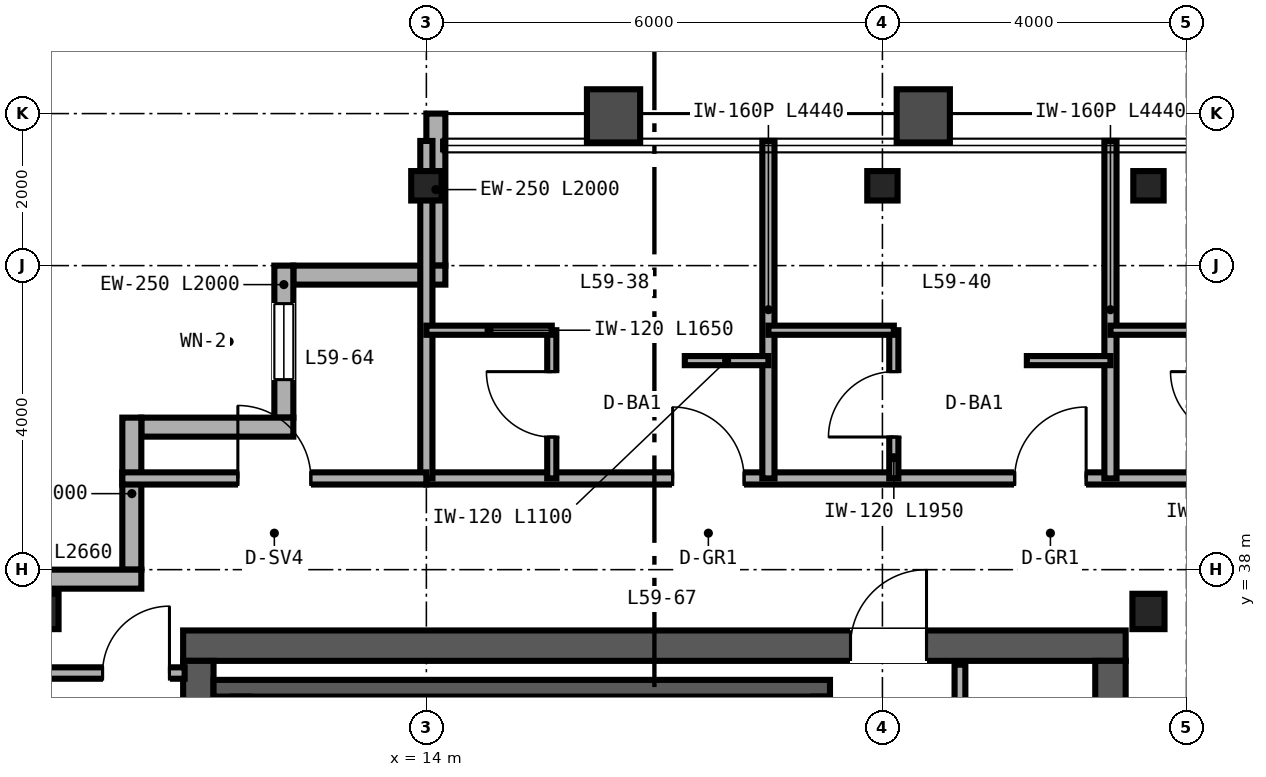
"""IFC4 building model, lengths in metres.
Left out: names, types, materials, properties, quantities, classifications, styles, units other than length and angle.
Written with IfcOpenShell. Run it as: python <this file> out.ifc"""

import sys

from ifc_helpers import new_model, si_unit, direction, frame, frame_2d, origin, origin_2d, place, context, subcontext, project, spatial, rectangle, i_section, extrude, source, transform, mapped, element, fill, save


model = new_model("IFC4")
c1 = context("Model", 3, precision=1e-05, world=origin(), true_north=direction((0.0, 1.0)))
c2 = subcontext(c1, "Body", "Model", "MODEL_VIEW")
j1 = project(units=[si_unit("LENGTHUNIT", "METRE"), si_unit("PLANEANGLEUNIT", "RADIAN")], contexts=[c1])
p1 = place(None, origin())
s1 = spatial("IfcSite", under=j1, at=p1, CompositionType="ELEMENT")
p2 = place(p1, origin())
s2 = spatial("IfcBuilding", under=s1, at=p2, CompositionType="ELEMENT")
p3 = place(p2, frame((0.0, 0.0, 236.4)))
s3 = spatial("IfcBuildingStorey", under=s2, at=p3, CompositionType="ELEMENT", Elevation=236.4)
p4 = place(p3, frame((10.8, 37.0, 0.0), z_axis=(0.0, 0.0, 1.0), x_axis=(1.0, 0.0, 0.0)))
e1 = element("IfcWall", 1, at=p4, inside=s3, PredefinedType="SHEAR", context=c2, shape_type="SweptSolid", body=[
    extrude(rectangle(XDim=12.4, YDim=0.4, at=frame_2d((6.2, 0.0))), origin(), (0.0, 0.0, 1.0), 3.38),
])
p5 = place(p4, frame((8.78, 0.0, 0.0)))
e2 = element("IfcOpeningElement", 2, at=p5, cuts=e1, PredefinedType="OPENING", context=c2, shape_type="SweptSolid", body=[
    extrude(rectangle(XDim=1.0, YDim=2.15, at=frame_2d((0.5, 1.075))), frame((0.0, 0.21, 0.0), z_axis=(0.0, -1.0, 0.0), x_axis=(1.0, 0.0, 0.0)), (0.0, 0.0, 1.0), 0.42),
])
for number, where, z_axis, x_axis in (
    (3, (11.0, 15.2, 0.0), (0.0, 0.0, 1.0), (0.0, 1.0, 0.0)),
    (4, (23.0, 15.2, 0.0), (0.0, 0.0, 1.0), (0.0, 1.0, 0.0)),
):
    element("IfcWall", number, at=place(p3, frame(where, z_axis=z_axis, x_axis=x_axis)), inside=s3, PredefinedType="SHEAR", context=c2, shape_type="SweptSolid", body=[
        extrude(rectangle(XDim=21.6, YDim=0.4, at=frame_2d((10.8, 0.0))), origin(), (0.0, 0.0, 1.0), 3.38),
    ])
p6 = place(p3, frame((11.2, 36.44, 0.0), z_axis=(0.0, 0.0, 1.0), x_axis=(1.0, 0.0, 0.0)))
e5 = element("IfcWall", 5, at=p6, inside=s3, PredefinedType="SHEAR", context=c2, shape_type="SweptSolid", body=[
    extrude(rectangle(XDim=8.11, YDim=0.22, at=frame_2d((4.055, 0.0))), origin(), (0.0, 0.0, 1.0), 3.4),
])
for number, where, z_axis, x_axis in (
    (6, (11.56, 33.05, 0.0), (0.0, 0.0, 1.0), (0.0, 1.0, 0.0)),
    (7, (19.2, 33.05, 0.0), (0.0, 0.0, 1.0), (0.0, 1.0, 0.0)),
):
    element("IfcWall", number, at=place(p3, frame(where, z_axis=z_axis, x_axis=x_axis)), inside=s3, PredefinedType="SHEAR", context=c2, shape_type="SweptSolid", body=[
        extrude(rectangle(XDim=3.28, YDim=0.22, at=frame_2d((1.64, 0.0))), origin(), (0.0, 0.0, 1.0), 3.4),
    ])
m1 = source(origin(), c2, "Body", "SweptSolid", [
    extrude(i_section(OverallWidth=0.422, OverallDepth=0.465, WebThickness=0.045, FlangeThickness=0.073, FilletRadius=0.025, at=origin_2d()), origin(), (0.0, 0.0, 1.0), 3.38),
])
for number, where, z_axis, x_axis in (
    (8, (8.95, 37.45, 0.0), (0.0, 0.0, 1.0), (1.0, 0.0, 0.0)),
    (9, (23.5, 37.45, 0.0), (0.0, 0.0, 1.0), (1.0, 0.0, 0.0)),
):
    element("IfcColumn", number, at=place(p3, frame(where, z_axis=z_axis, x_axis=x_axis)), inside=s3, PredefinedType="COLUMN", context=c2, shape_type="MappedRepresentation", body=[
        mapped(m1, transform((0.0, 0.0, 0.0), scale=1.0)),
    ])
m2 = source(origin(), c2, "Body", "SweptSolid", [
    extrude(i_section(OverallWidth=0.399, OverallDepth=0.387, WebThickness=0.021, FlangeThickness=0.033, FilletRadius=0.025, at=origin_2d()), origin(), (0.0, 0.0, 1.0), 3.38),
])
for number, where, z_axis, x_axis in (
    (10, (14.0, 43.05, 0.0), (0.0, 0.0, 1.0), (1.0, 0.0, 0.0)),
    (11, (20.0, 43.05, 0.0), (0.0, 0.0, 1.0), (1.0, 0.0, 0.0)),
    (12, (23.5, 43.05, 0.0), (0.0, 0.0, 1.0), (1.0, 0.0, 0.0)),
):
    element("IfcColumn", number, at=place(p3, frame(where, z_axis=z_axis, x_axis=x_axis)), inside=s3, PredefinedType="COLUMN", context=c2, shape_type="MappedRepresentation", body=[
        mapped(m2, transform((0.0, 0.0, 0.0), scale=1.0)),
    ])
p7 = place(p3, frame((14.125, 44.0, 0.0), z_axis=(0.0, 0.0, 1.0), x_axis=(0.0, -1.0, 0.0)))
e13 = element("IfcWall", 13, at=p7, inside=s3, PredefinedType="SOLIDWALL", context=c2, shape_type="SweptSolid", body=[
    extrude(rectangle(XDim=2.0, YDim=0.25, at=frame_2d((1.0, 0.0))), origin(), (0.0, 0.0, 1.0), 2.687),
])
p8 = place(p3, frame((14.25, 41.875, 0.0), z_axis=(0.0, 0.0, 1.0), x_axis=(-1.0, 0.0, 0.0)))
e14 = element("IfcWall", 14, at=p8, inside=s3, PredefinedType="SOLIDWALL", context=c2, shape_type="SweptSolid", body=[
    extrude(rectangle(XDim=2.0, YDim=0.25, at=frame_2d((1.0, 0.0))), origin(), (0.0, 0.0, 1.0), 3.38),
])
p9 = place(p3, frame((12.125, 42.0, 0.0), z_axis=(0.0, 0.0, 1.0), x_axis=(0.0, -1.0, 0.0)))
e15 = element("IfcWall", 15, at=p9, inside=s3, PredefinedType="SOLIDWALL", context=c2, shape_type="SweptSolid", body=[
    extrude(rectangle(XDim=2.0, YDim=0.25, at=frame_2d((1.0, 0.0))), origin(), (0.0, 0.0, 1.0), 3.38),
])
p10 = place(p9, frame((0.5, 0.0, 0.85)))
e16 = element("IfcOpeningElement", 16, at=p10, cuts=e15, PredefinedType="OPENING", context=c2, shape_type="SweptSolid", body=[
    extrude(rectangle(XDim=1.0, YDim=1.9, at=frame_2d((0.5, 0.95))), frame((0.0, 0.135, 0.0), z_axis=(0.0, -1.0, 0.0), x_axis=(1.0, 0.0, 0.0)), (0.0, 0.0, 1.0), 0.27),
])
for number, where, z_axis, x_axis in (
    (17, (12.25, 39.875, 0.0), (0.0, 0.0, 1.0), (-1.0, 0.0, 0.0)),
    (18, (10.125, 40.0, 0.0), (0.0, 0.0, 1.0), (0.0, -1.0, 0.0)),
):
    element("IfcWall", number, at=place(p3, frame(where, z_axis=z_axis, x_axis=x_axis)), inside=s3, PredefinedType="SOLIDWALL", context=c2, shape_type="SweptSolid", body=[
        extrude(rectangle(XDim=2.0, YDim=0.25, at=frame_2d((1.0, 0.0))), origin(), (0.0, 0.0, 1.0), 3.38),
    ])
p11 = place(p3, frame((10.25, 37.875, 0.0), z_axis=(0.0, 0.0, 1.0), x_axis=(-1.0, 0.0, 0.0)))
e19 = element("IfcWall", 19, at=p11, inside=s3, PredefinedType="SOLIDWALL", context=c2, shape_type="SweptSolid", body=[
    extrude(rectangle(XDim=2.25, YDim=0.25, at=frame_2d((1.125, 0.0))), origin(), (0.0, 0.0, 1.0), 3.38),
])
p12 = place(p3, frame((21.02, 33.28, 0.0), z_axis=(0.0, 0.0, 1.0), x_axis=(0.0, 1.0, 0.0)))
e20 = element("IfcWall", 20, at=p12, inside=s3, PredefinedType="PARTITIONING", context=c2, shape_type="SweptSolid", body=[
    extrude(rectangle(XDim=3.47, YDim=0.142, at=frame_2d((1.735, 0.0))), origin(), (0.0, 0.0, 1.0), 3.38),
])
p13 = place(p12, frame((1.15, 0.0, 0.0)))
e21 = element("IfcOpeningElement", 21, at=p13, cuts=e20, PredefinedType="OPENING", context=c2, shape_type="SweptSolid", body=[
    extrude(rectangle(XDim=0.84, YDim=2.1, at=frame_2d((0.42, 1.05))), frame((0.0, 0.081, 0.0), z_axis=(0.0, -1.0, 0.0), x_axis=(1.0, 0.0, 0.0)), (0.0, 0.0, 1.0), 0.162),
])
p14 = place(p3, frame((14.0, 39.2, 0.0), z_axis=(0.0, 0.0, 1.0), x_axis=(1.0, 0.0, 0.0)))
e22 = element("IfcWall", 22, at=p14, inside=s3, PredefinedType="PARTITIONING", context=c2, shape_type="SweptSolid", body=[
    extrude(rectangle(XDim=36.0, YDim=0.16, at=frame_2d((18.0, 0.0))), origin(), (0.0, 0.0, 1.0), 2.923),
])
p15 = place(p14, frame((3.24, 0.0, 0.0)))
e23 = element("IfcOpeningElement", 23, at=p15, cuts=e22, PredefinedType="OPENING", context=c2, shape_type="SweptSolid", body=[
    extrude(rectangle(XDim=0.94, YDim=2.15, at=frame_2d((0.47, 1.075))), frame((0.0, 0.09, 0.0), z_axis=(0.0, -1.0, 0.0), x_axis=(1.0, 0.0, 0.0)), (0.0, 0.0, 1.0), 0.18),
])
p16 = place(p14, frame((7.74, 0.0, 0.0)))
e24 = element("IfcOpeningElement", 24, at=p16, cuts=e22, PredefinedType="OPENING", context=c2, shape_type="SweptSolid", body=[
    extrude(rectangle(XDim=0.94, YDim=2.15, at=frame_2d((0.47, 1.075))), frame((0.0, 0.09, 0.0), z_axis=(0.0, -1.0, 0.0), x_axis=(1.0, 0.0, 0.0)), (0.0, 0.0, 1.0), 0.18),
])
p17 = place(p14, frame((12.24, 0.0, 0.0)))
e25 = element("IfcOpeningElement", 25, at=p17, cuts=e22, PredefinedType="OPENING", context=c2, shape_type="SweptSolid", body=[
    extrude(rectangle(XDim=0.94, YDim=2.15, at=frame_2d((0.47, 1.075))), frame((0.0, 0.09, 0.0), z_axis=(0.0, -1.0, 0.0), x_axis=(1.0, 0.0, 0.0)), (0.0, 0.0, 1.0), 0.18),
])
p18 = place(p14, frame((16.74, 0.0, 0.0)))
e26 = element("IfcOpeningElement", 26, at=p18, cuts=e22, PredefinedType="OPENING", context=c2, shape_type="SweptSolid", body=[
    extrude(rectangle(XDim=0.94, YDim=2.15, at=frame_2d((0.47, 1.075))), frame((0.0, 0.09, 0.0), z_axis=(0.0, -1.0, 0.0), x_axis=(1.0, 0.0, 0.0)), (0.0, 0.0, 1.0), 0.18),
])
p19 = place(p14, frame((21.24, 0.0, 0.0)))
e27 = element("IfcOpeningElement", 27, at=p19, cuts=e22, PredefinedType="OPENING", context=c2, shape_type="SweptSolid", body=[
    extrude(rectangle(XDim=0.94, YDim=2.15, at=frame_2d((0.47, 1.075))), frame((0.0, 0.09, 0.0), z_axis=(0.0, -1.0, 0.0), x_axis=(1.0, 0.0, 0.0)), (0.0, 0.0, 1.0), 0.18),
])
p20 = place(p14, frame((25.74, 0.0, 0.0)))
e28 = element("IfcOpeningElement", 28, at=p20, cuts=e22, PredefinedType="OPENING", context=c2, shape_type="SweptSolid", body=[
    extrude(rectangle(XDim=0.94, YDim=2.15, at=frame_2d((0.47, 1.075))), frame((0.0, 0.09, 0.0), z_axis=(0.0, -1.0, 0.0), x_axis=(1.0, 0.0, 0.0)), (0.0, 0.0, 1.0), 0.18),
])
p21 = place(p14, frame((30.24, 0.0, 0.0)))
e29 = element("IfcOpeningElement", 29, at=p21, cuts=e22, PredefinedType="OPENING", context=c2, shape_type="SweptSolid", body=[
    extrude(rectangle(XDim=0.94, YDim=2.15, at=frame_2d((0.47, 1.075))), frame((0.0, 0.09, 0.0), z_axis=(0.0, -1.0, 0.0), x_axis=(1.0, 0.0, 0.0)), (0.0, 0.0, 1.0), 0.18),
])
p22 = place(p14, frame((34.74, 0.0, 0.0)))
e30 = element("IfcOpeningElement", 30, at=p22, cuts=e22, PredefinedType="OPENING", context=c2, shape_type="SweptSolid", body=[
    extrude(rectangle(XDim=0.94, YDim=2.15, at=frame_2d((0.47, 1.075))), frame((0.0, 0.09, 0.0), z_axis=(0.0, -1.0, 0.0), x_axis=(1.0, 0.0, 0.0)), (0.0, 0.0, 1.0), 0.18),
])
for number, where, z_axis, x_axis in (
    (31, (14.0, 39.2, 0.0), (0.0, 0.0, 1.0), (0.0, 1.0, 0.0)),
    (32, (18.5, 39.2, 0.0), (0.0, 0.0, 1.0), (0.0, 1.0, 0.0)),
):
    element("IfcWall", number, at=place(p3, frame(where, z_axis=z_axis, x_axis=x_axis)), inside=s3, PredefinedType="PARTITIONING", context=c2, shape_type="SweptSolid", body=[
        extrude(rectangle(XDim=4.44, YDim=0.16, at=frame_2d((2.22, 0.0))), origin(), (0.0, 0.0, 1.0), 2.687),
    ])
p23 = place(p3, frame((15.65, 39.2, 0.0), z_axis=(0.0, 0.0, 1.0), x_axis=(0.0, 1.0, 0.0)))
e33 = element("IfcWall", 33, at=p23, inside=s3, PredefinedType="PARTITIONING", context=c2, shape_type="SweptSolid", body=[
    extrude(rectangle(XDim=1.95, YDim=0.12, at=frame_2d((0.975, 0.0))), origin(), (0.0, 0.0, 1.0), 3.38),
])
p24 = place(p23, frame((0.545, 0.0, 0.0)))
e34 = element("IfcOpeningElement", 34, at=p24, cuts=e33, PredefinedType="OPENING", context=c2, shape_type="SweptSolid", body=[
    extrude(rectangle(XDim=0.86, YDim=2.1, at=frame_2d((0.43, 1.05))), frame((0.0, 0.07, 0.0), z_axis=(0.0, -1.0, 0.0), x_axis=(1.0, 0.0, 0.0)), (0.0, 0.0, 1.0), 0.14),
])
p25 = place(p3, frame((14.0, 41.15, 0.0), z_axis=(0.0, 0.0, 1.0), x_axis=(1.0, 0.0, 0.0)))
e35 = element("IfcWall", 35, at=p25, inside=s3, PredefinedType="PARTITIONING", context=c2, shape_type="SweptSolid", body=[
    extrude(rectangle(XDim=1.65, YDim=0.12, at=frame_2d((0.825, 0.0))), origin(), (0.0, 0.0, 1.0), 3.38),
])
p26 = place(p3, frame((17.4, 40.75, 0.0), z_axis=(0.0, 0.0, 1.0), x_axis=(1.0, 0.0, 0.0)))
e36 = element("IfcWall", 36, at=p26, inside=s3, PredefinedType="PARTITIONING", context=c2, shape_type="SweptSolid", body=[
    extrude(rectangle(XDim=1.1, YDim=0.12, at=frame_2d((0.55, 0.0))), origin(), (0.0, 0.0, 1.0), 3.38),
])
p27 = place(p3, frame((23.0, 39.2, 0.0), z_axis=(0.0, 0.0, 1.0), x_axis=(0.0, 1.0, 0.0)))
e37 = element("IfcWall", 37, at=p27, inside=s3, PredefinedType="PARTITIONING", context=c2, shape_type="SweptSolid", body=[
    extrude(rectangle(XDim=4.44, YDim=0.16, at=frame_2d((2.22, 0.0))), origin(), (0.0, 0.0, 1.0), 2.843),
])
p28 = place(p3, frame((20.15, 39.2, 0.0), z_axis=(0.0, 0.0, 1.0), x_axis=(0.0, 1.0, 0.0)))
e38 = element("IfcWall", 38, at=p28, inside=s3, PredefinedType="PARTITIONING", context=c2, shape_type="SweptSolid", body=[
    extrude(rectangle(XDim=1.95, YDim=0.12, at=frame_2d((0.975, 0.0))), origin(), (0.0, 0.0, 1.0), 3.38),
])
p29 = place(p28, frame((0.545, 0.0, 0.0)))
e39 = element("IfcOpeningElement", 39, at=p29, cuts=e38, PredefinedType="OPENING", context=c2, shape_type="SweptSolid", body=[
    extrude(rectangle(XDim=0.86, YDim=2.1, at=frame_2d((0.43, 1.05))), frame((0.0, 0.07, 0.0), z_axis=(0.0, -1.0, 0.0), x_axis=(1.0, 0.0, 0.0)), (0.0, 0.0, 1.0), 0.14),
])
p30 = place(p3, frame((18.5, 41.15, 0.0), z_axis=(0.0, 0.0, 1.0), x_axis=(1.0, 0.0, 0.0)))
e40 = element("IfcWall", 40, at=p30, inside=s3, PredefinedType="PARTITIONING", context=c2, shape_type="SweptSolid", body=[
    extrude(rectangle(XDim=1.65, YDim=0.12, at=frame_2d((0.825, 0.0))), origin(), (0.0, 0.0, 1.0), 3.38),
])
p31 = place(p3, frame((21.9, 40.75, 0.0), z_axis=(0.0, 0.0, 1.0), x_axis=(1.0, 0.0, 0.0)))
e41 = element("IfcWall", 41, at=p31, inside=s3, PredefinedType="PARTITIONING", context=c2, shape_type="SweptSolid", body=[
    extrude(rectangle(XDim=1.1, YDim=0.12, at=frame_2d((0.55, 0.0))), origin(), (0.0, 0.0, 1.0), 3.38),
])
p32 = place(p3, frame((23.0, 41.15, 0.0), z_axis=(0.0, 0.0, 1.0), x_axis=(1.0, 0.0, 0.0)))
e42 = element("IfcWall", 42, at=p32, inside=s3, PredefinedType="PARTITIONING", context=c2, shape_type="SweptSolid", body=[
    extrude(rectangle(XDim=1.65, YDim=0.12, at=frame_2d((0.825, 0.0))), origin(), (0.0, 0.0, 1.0), 2.923),
])
p33 = place(p3, frame((8.16, 36.64, 0.0), z_axis=(0.0, 0.0, 1.0), x_axis=(1.0, 0.0, 0.0)))
e43 = element("IfcWall", 43, at=p33, inside=s3, PredefinedType="PARTITIONING", context=c2, shape_type="SweptSolid", body=[
    extrude(rectangle(XDim=2.66, YDim=0.15, at=frame_2d((1.33, 0.0))), origin(), (0.0, 0.0, 1.0), 2.763),
])
p34 = place(p33, frame((1.58, 0.0, 0.0)))
e44 = element("IfcOpeningElement", 44, at=p34, cuts=e43, PredefinedType="OPENING", context=c2, shape_type="SweptSolid", body=[
    extrude(rectangle(XDim=0.88, YDim=2.15, at=frame_2d((0.44, 1.075))), frame((0.0, 0.085, 0.0), z_axis=(0.0, -1.0, 0.0), x_axis=(1.0, 0.0, 0.0)), (0.0, 0.0, 1.0), 0.17),
])
p35 = place(p3, frame((10.0, 39.2, 0.0), z_axis=(0.0, 0.0, 1.0), x_axis=(1.0, 0.0, 0.0)))
e45 = element("IfcWall", 45, at=p35, inside=s3, PredefinedType="PARTITIONING", context=c2, shape_type="SweptSolid", body=[
    extrude(rectangle(XDim=4.0, YDim=0.16, at=frame_2d((2.0, 0.0))), origin(), (0.0, 0.0, 1.0), 3.38),
])
p36 = place(p35, frame((1.52, 0.0, 0.0)))
e46 = element("IfcOpeningElement", 46, at=p36, cuts=e45, PredefinedType="OPENING", context=c2, shape_type="SweptSolid", body=[
    extrude(rectangle(XDim=0.96, YDim=2.15, at=frame_2d((0.48, 1.075))), frame((0.0, 0.09, 0.0), z_axis=(0.0, -1.0, 0.0), x_axis=(1.0, 0.0, 0.0)), (0.0, 0.0, 1.0), 0.18),
])
m3 = source(origin(), c2, "Body", "SweptSolid", [
    extrude(rectangle(XDim=1.0, YDim=1.9, at=frame_2d((0.5, 0.95))), frame((0.0, 0.03, 0.0), z_axis=(0.0, -1.0, 0.0), x_axis=(1.0, 0.0, 0.0)), (0.0, 0.0, 1.0), 0.06),
])
p37 = place(p10, origin())
e47 = element("IfcWindow", 47, at=p37, inside=s3, PartitioningType="SINGLE_PANEL", PredefinedType="WINDOW", context=c2, shape_type="MappedRepresentation", body=[
    mapped(m3, transform((0.0, 0.0, 0.0), scale=1.0)),
])
fill(e16, e47)
m4 = source(origin(), c2, "Body", "SweptSolid", [
    extrude(rectangle(XDim=1.0, YDim=2.15, at=frame_2d((0.5, 1.075))), frame((0.0, 0.025, 0.0), z_axis=(0.0, -1.0, 0.0), x_axis=(1.0, 0.0, 0.0)), (0.0, 0.0, 1.0), 0.05),
])
p38 = place(p5, origin())
e48 = element("IfcDoor", 48, at=p38, inside=s3, OperationType="SINGLE_SWING_RIGHT", PredefinedType="DOOR", context=c2, shape_type="MappedRepresentation", body=[
    mapped(m4, transform((0.0, 0.0, 0.0), scale=1.0)),
])
fill(e2, e48)
m5 = source(origin(), c2, "Body", "SweptSolid", [
    extrude(rectangle(XDim=0.86, YDim=2.1, at=frame_2d((0.43, 1.05))), frame((0.0, 0.025, 0.0), z_axis=(0.0, -1.0, 0.0), x_axis=(1.0, 0.0, 0.0)), (0.0, 0.0, 1.0), 0.05),
])
p39 = place(p24, origin())
e49 = element("IfcDoor", 49, at=p39, inside=s3, OperationType="SINGLE_SWING_RIGHT", PredefinedType="DOOR", context=c2, shape_type="MappedRepresentation", body=[
    mapped(m5, transform((0.0, 0.0, 0.0), scale=1.0)),
])
fill(e34, e49)
p40 = place(p29, origin())
e50 = element("IfcDoor", 50, at=p40, inside=s3, OperationType="SINGLE_SWING_LEFT", PredefinedType="DOOR", context=c2, shape_type="MappedRepresentation", body=[
    mapped(m5, transform((0.0, 0.0, 0.0), scale=1.0)),
])
fill(e39, e50)
m6 = source(origin(), c2, "Body", "SweptSolid", [
    extrude(rectangle(XDim=0.94, YDim=2.15, at=frame_2d((0.47, 1.075))), frame((0.0, 0.025, 0.0), z_axis=(0.0, -1.0, 0.0), x_axis=(1.0, 0.0, 0.0)), (0.0, 0.0, 1.0), 0.05),
])
p41 = place(p15, origin())
e51 = element("IfcDoor", 51, at=p41, inside=s3, OperationType="SINGLE_SWING_LEFT", PredefinedType="DOOR", context=c2, shape_type="MappedRepresentation", body=[
    mapped(m6, transform((0.0, 0.0, 0.0), scale=1.0)),
])
fill(e23, e51)
p42 = place(p16, origin())
e52 = element("IfcDoor", 52, at=p42, inside=s3, OperationType="SINGLE_SWING_RIGHT", PredefinedType="DOOR", context=c2, shape_type="MappedRepresentation", body=[
    mapped(m6, transform((0.0, 0.0, 0.0), scale=1.0)),
])
fill(e24, e52)
m7 = source(origin(), c2, "Body", "SweptSolid", [
    extrude(rectangle(XDim=0.88, YDim=2.15, at=frame_2d((0.44, 1.075))), frame((0.0, 0.025, 0.0), z_axis=(0.0, -1.0, 0.0), x_axis=(1.0, 0.0, 0.0)), (0.0, 0.0, 1.0), 0.05),
])
p43 = place(p34, origin())
e53 = element("IfcDoor", 53, at=p43, inside=s3, OperationType="SINGLE_SWING_RIGHT", PredefinedType="DOOR", context=c2, shape_type="MappedRepresentation", body=[
    mapped(m7, transform((0.0, 0.0, 0.0), scale=1.0)),
])
fill(e44, e53)
m8 = source(origin(), c2, "Body", "SweptSolid", [
    extrude(rectangle(XDim=0.96, YDim=2.15, at=frame_2d((0.48, 1.075))), frame((0.0, 0.025, 0.0), z_axis=(0.0, -1.0, 0.0), x_axis=(1.0, 0.0, 0.0)), (0.0, 0.0, 1.0), 0.05),
])
p44 = place(p36, origin())
e54 = element("IfcDoor", 54, at=p44, inside=s3, OperationType="SINGLE_SWING_LEFT", PredefinedType="DOOR", context=c2, shape_type="MappedRepresentation", body=[
    mapped(m8, transform((0.0, 0.0, 0.0), scale=1.0)),
])
fill(e46, e54)
save(model, sys.argv[1])
